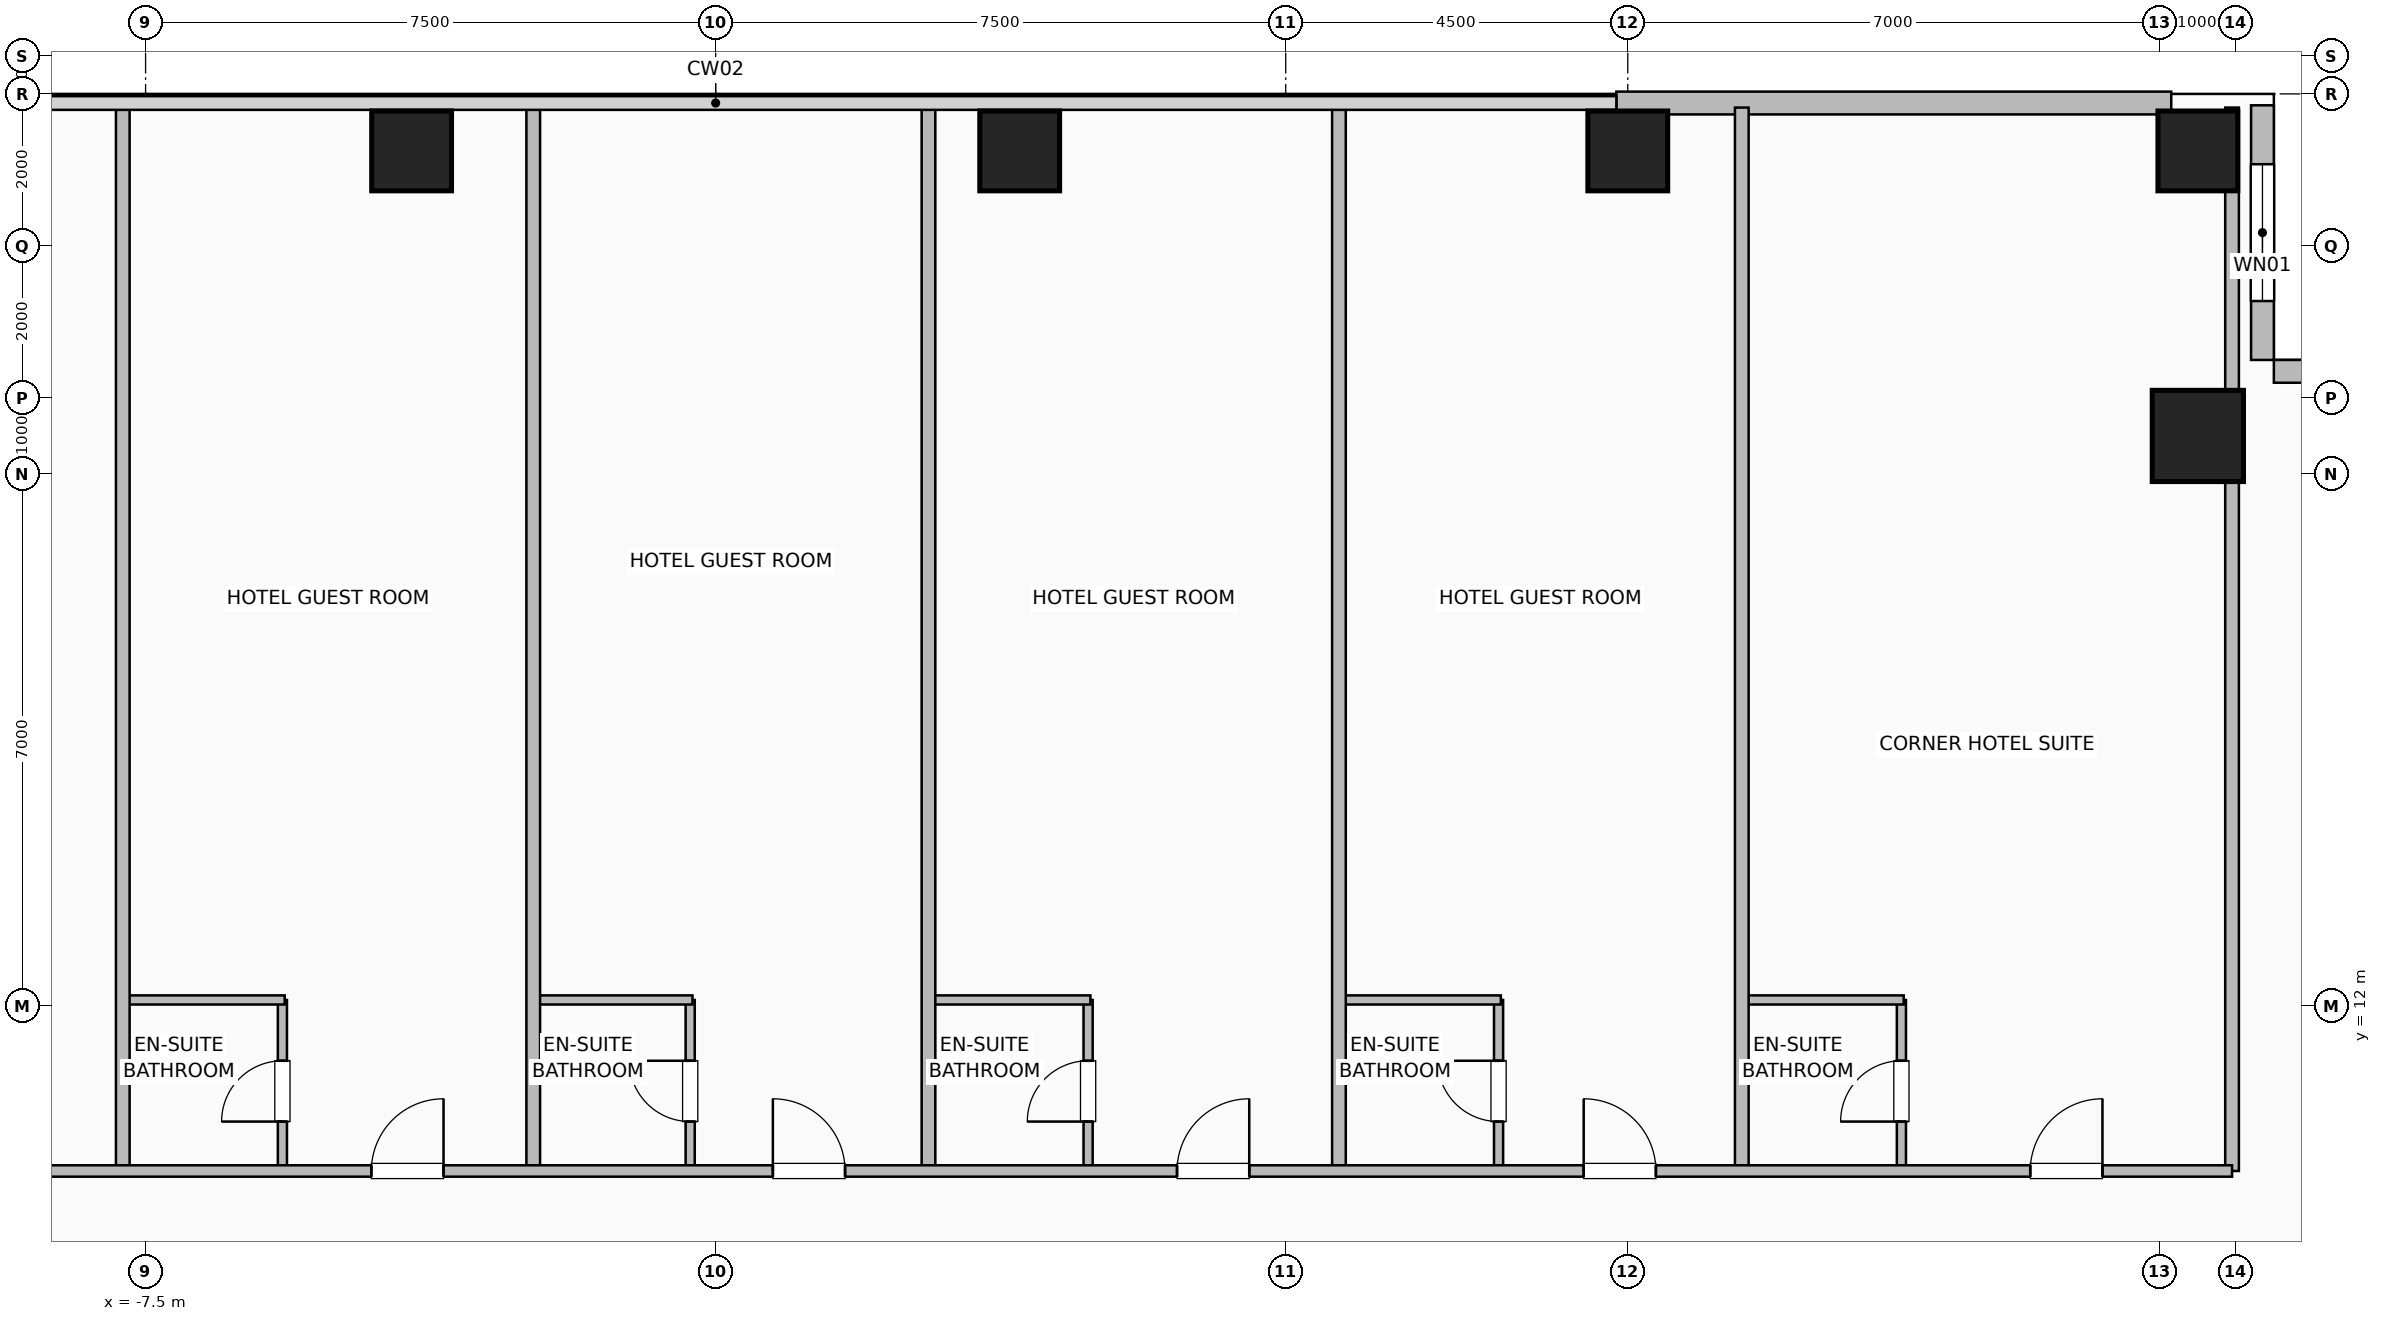
"""IFC4 building model, lengths in metres.
Left out: names, types, materials, properties, quantities, classifications, styles, units other than length and angle.
Written with IfcOpenShell. Run it as: python <this file> out.ifc"""

import sys

from ifc_helpers import new_model, si_unit, direction, frame, frame_2d, origin, origin_2d, place, context, subcontext, project, spatial, rectangle, hollow_rectangle, extrude, element, fill, save


model = new_model("IFC4")
c1 = context("Model", 3, precision=1e-05, world=origin(), true_north=direction((0.0, 1.0)))
c2 = subcontext(c1, "Body", "Model", "MODEL_VIEW")
j1 = project(units=[si_unit("LENGTHUNIT", "METRE"), si_unit("PLANEANGLEUNIT", "RADIAN")], contexts=[c1])
p1 = place(None, origin())
s1 = spatial("IfcSite", under=j1, at=p1, CompositionType="ELEMENT")
p2 = place(p1, origin())
s2 = spatial("IfcBuilding", under=s1, at=p2, CompositionType="ELEMENT")
p3 = place(p2, frame((0.0, 0.0, 34.0)))
s3 = spatial("IfcBuildingStorey", under=s2, at=p3, CompositionType="ELEMENT", Elevation=34.0)
for number, where, z_axis, x_axis in (
    (1, (-4.0, 23.25, 0.0), (0.0, 0.0, 1.0), (1.0, 0.0, 0.0)),
    (2, (4.0, 23.25, 0.0), (0.0, 0.0, 1.0), (1.0, 0.0, 0.0)),
    (3, (12.0, 23.25, 0.0), (0.0, 0.0, 1.0), (1.0, 0.0, 0.0)),
    (4, (19.5, 23.25, 0.0), (0.0, 0.0, 1.0), (1.0, 0.0, 0.0)),
):
    element("IfcColumn", number, at=place(p3, frame(where, z_axis=z_axis, x_axis=x_axis)), inside=s3, PredefinedType="COLUMN", context=c2, shape_type="SweptSolid", body=[
        extrude(hollow_rectangle(XDim=1.05, YDim=1.05, WallThickness=0.05, at=origin_2d()), origin(), (0.0, 0.0, 1.0), 3.5),
    ])
p4 = place(p3, frame((19.5, 19.5, 0.0), z_axis=(0.0, 0.0, 1.0), x_axis=(1.0, 0.0, 0.0)))
e5 = element("IfcColumn", 5, at=p4, inside=s3, PredefinedType="COLUMN", context=c2, shape_type="SweptSolid", body=[
    extrude(hollow_rectangle(XDim=1.2, YDim=1.2, WallThickness=0.055, at=origin_2d()), origin(), (0.0, 0.0, 1.0), 3.5),
])
p5 = place(p3, frame((11.85, 23.88, 0.0), z_axis=(0.0, 0.0, 1.0), x_axis=(1.0, 0.0, 0.0)))
e6 = element("IfcWall", 6, at=p5, inside=s3, PredefinedType="SOLIDWALL", context=c2, shape_type="SweptSolid", body=[
    extrude(rectangle(XDim=7.3, YDim=0.3, at=frame_2d((3.65, 0.0))), origin(), (0.0, 0.0, 1.0), 3.25),
])
p6 = place(p3, frame((20.35, 23.85, 0.0), z_axis=(0.0, 0.0, 1.0), x_axis=(0.0, -1.0, 0.0)))
e7 = element("IfcWall", 7, at=p6, inside=s3, PredefinedType="SOLIDWALL", context=c2, shape_type="SweptSolid", body=[
    extrude(rectangle(XDim=3.35, YDim=0.3, at=frame_2d((1.675, 0.0))), origin(), (0.0, 0.0, 1.0), 3.25),
])
p7 = place(p6, frame((0.775, 0.0, 0.9)))
e8 = element("IfcOpeningElement", 8, at=p7, cuts=e7, PredefinedType="OPENING", context=c2, shape_type="SweptSolid", body=[
    extrude(rectangle(XDim=1.8, YDim=1.8, at=frame_2d((0.9, 0.9))), frame((0.0, 0.16, 0.0), z_axis=(0.0, -1.0, 0.0), x_axis=(1.0, 0.0, 0.0)), (0.0, 0.0, 1.0), 0.32),
])
p8 = place(p3, frame((23.85, 20.35, 0.0), z_axis=(0.0, 0.0, 1.0), x_axis=(-1.0, 0.0, 0.0)))
e9 = element("IfcWall", 9, at=p8, inside=s3, PredefinedType="SOLIDWALL", context=c2, shape_type="SweptSolid", body=[
    extrude(rectangle(XDim=3.35, YDim=0.3, at=frame_2d((1.675, 0.0))), origin(), (0.0, 0.0, 1.0), 3.25),
])
p9 = place(p3, frame((-5.7, 9.83, 0.0), z_axis=(0.0, 0.0, 1.0), x_axis=(0.0, 1.0, 0.0)))
e10 = element("IfcWall", 10, at=p9, inside=s3, PredefinedType="PLUMBINGWALL", context=c2, shape_type="SweptSolid", body=[
    extrude(rectangle(XDim=2.25, YDim=0.12, at=frame_2d((1.125, 0.0))), origin(), (0.0, 0.0, 1.0), 3.25),
])
p10 = place(p9, frame((0.65, 0.0, 0.0)))
e11 = element("IfcOpeningElement", 11, at=p10, cuts=e10, PredefinedType="OPENING", context=c2, shape_type="SweptSolid", body=[
    extrude(rectangle(XDim=0.8, YDim=2.05, at=frame_2d((0.4, 1.025))), frame((0.0, 0.07, 0.0), z_axis=(0.0, -1.0, 0.0), x_axis=(1.0, 0.0, 0.0)), (0.0, 0.0, 1.0), 0.14),
])
p11 = place(p3, frame((-7.77, 12.08, 0.0), z_axis=(0.0, 0.0, 1.0), x_axis=(1.0, 0.0, 0.0)))
e12 = element("IfcWall", 12, at=p11, inside=s3, PredefinedType="PLUMBINGWALL", context=c2, shape_type="SweptSolid", body=[
    extrude(rectangle(XDim=2.1, YDim=0.12, at=frame_2d((1.05, 0.0))), origin(), (0.0, 0.0, 1.0), 3.25),
])
p12 = place(p3, frame((-0.335, 9.83, 0.0), z_axis=(0.0, 0.0, 1.0), x_axis=(0.0, 1.0, 0.0)))
e13 = element("IfcWall", 13, at=p12, inside=s3, PredefinedType="PLUMBINGWALL", context=c2, shape_type="SweptSolid", body=[
    extrude(rectangle(XDim=2.25, YDim=0.12, at=frame_2d((1.125, 0.0))), origin(), (0.0, 0.0, 1.0), 3.25),
])
p13 = place(p12, frame((0.65, 0.0, 0.0)))
e14 = element("IfcOpeningElement", 14, at=p13, cuts=e13, PredefinedType="OPENING", context=c2, shape_type="SweptSolid", body=[
    extrude(rectangle(XDim=0.8, YDim=2.05, at=frame_2d((0.4, 1.025))), frame((0.0, 0.07, 0.0), z_axis=(0.0, -1.0, 0.0), x_axis=(1.0, 0.0, 0.0)), (0.0, 0.0, 1.0), 0.14),
])
p14 = place(p3, frame((-2.37, 12.08, 0.0), z_axis=(0.0, 0.0, 1.0), x_axis=(1.0, 0.0, 0.0)))
e15 = element("IfcWall", 15, at=p14, inside=s3, PredefinedType="PLUMBINGWALL", context=c2, shape_type="SweptSolid", body=[
    extrude(rectangle(XDim=2.065, YDim=0.12, at=frame_2d((1.033, 0.0))), origin(), (0.0, 0.0, 1.0), 3.25),
])
p15 = place(p3, frame((4.9, 9.83, 0.0), z_axis=(0.0, 0.0, 1.0), x_axis=(0.0, 1.0, 0.0)))
e16 = element("IfcWall", 16, at=p15, inside=s3, PredefinedType="PLUMBINGWALL", context=c2, shape_type="SweptSolid", body=[
    extrude(rectangle(XDim=2.25, YDim=0.12, at=frame_2d((1.125, 0.0))), origin(), (0.0, 0.0, 1.0), 3.25),
])
p16 = place(p15, frame((0.65, 0.0, 0.0)))
e17 = element("IfcOpeningElement", 17, at=p16, cuts=e16, PredefinedType="OPENING", context=c2, shape_type="SweptSolid", body=[
    extrude(rectangle(XDim=0.8, YDim=2.05, at=frame_2d((0.4, 1.025))), frame((0.0, 0.07, 0.0), z_axis=(0.0, -1.0, 0.0), x_axis=(1.0, 0.0, 0.0)), (0.0, 0.0, 1.0), 0.14),
])
p17 = place(p3, frame((2.83, 12.08, 0.0), z_axis=(0.0, 0.0, 1.0), x_axis=(1.0, 0.0, 0.0)))
e18 = element("IfcWall", 18, at=p17, inside=s3, PredefinedType="PLUMBINGWALL", context=c2, shape_type="SweptSolid", body=[
    extrude(rectangle(XDim=2.1, YDim=0.12, at=frame_2d((1.05, 0.0))), origin(), (0.0, 0.0, 1.0), 3.25),
])
p18 = place(p3, frame((10.3, 9.83, 0.0), z_axis=(0.0, 0.0, 1.0), x_axis=(0.0, 1.0, 0.0)))
e19 = element("IfcWall", 19, at=p18, inside=s3, PredefinedType="PLUMBINGWALL", context=c2, shape_type="SweptSolid", body=[
    extrude(rectangle(XDim=2.25, YDim=0.12, at=frame_2d((1.125, 0.0))), origin(), (0.0, 0.0, 1.0), 3.25),
])
p19 = place(p18, frame((0.65, 0.0, 0.0)))
e20 = element("IfcOpeningElement", 20, at=p19, cuts=e19, PredefinedType="OPENING", context=c2, shape_type="SweptSolid", body=[
    extrude(rectangle(XDim=0.8, YDim=2.05, at=frame_2d((0.4, 1.025))), frame((0.0, 0.07, 0.0), z_axis=(0.0, -1.0, 0.0), x_axis=(1.0, 0.0, 0.0)), (0.0, 0.0, 1.0), 0.14),
])
p20 = place(p3, frame((8.23, 12.08, 0.0), z_axis=(0.0, 0.0, 1.0), x_axis=(1.0, 0.0, 0.0)))
e21 = element("IfcWall", 21, at=p20, inside=s3, PredefinedType="PLUMBINGWALL", context=c2, shape_type="SweptSolid", body=[
    extrude(rectangle(XDim=2.1, YDim=0.12, at=frame_2d((1.05, 0.0))), origin(), (0.0, 0.0, 1.0), 3.25),
])
p21 = place(p3, frame((15.6, 9.83, 0.0), z_axis=(0.0, 0.0, 1.0), x_axis=(0.0, 1.0, 0.0)))
e22 = element("IfcWall", 22, at=p21, inside=s3, PredefinedType="PLUMBINGWALL", context=c2, shape_type="SweptSolid", body=[
    extrude(rectangle(XDim=2.25, YDim=0.12, at=frame_2d((1.125, 0.0))), origin(), (0.0, 0.0, 1.0), 3.25),
])
p22 = place(p21, frame((0.65, 0.0, 0.0)))
e23 = element("IfcOpeningElement", 23, at=p22, cuts=e22, PredefinedType="OPENING", context=c2, shape_type="SweptSolid", body=[
    extrude(rectangle(XDim=0.8, YDim=2.05, at=frame_2d((0.4, 1.025))), frame((0.0, 0.07, 0.0), z_axis=(0.0, -1.0, 0.0), x_axis=(1.0, 0.0, 0.0)), (0.0, 0.0, 1.0), 0.14),
])
p23 = place(p3, frame((13.53, 12.08, 0.0), z_axis=(0.0, 0.0, 1.0), x_axis=(1.0, 0.0, 0.0)))
e24 = element("IfcWall", 24, at=p23, inside=s3, PredefinedType="PLUMBINGWALL", context=c2, shape_type="SweptSolid", body=[
    extrude(rectangle(XDim=2.1, YDim=0.12, at=frame_2d((1.05, 0.0))), origin(), (0.0, 0.0, 1.0), 3.25),
])
for number, where, z_axis, x_axis in (
    (25, (-7.8, 9.83, 0.0), (0.0, 0.0, 1.0), (0.0, 1.0, 0.0)),
    (26, (-2.4, 9.83, 0.0), (0.0, 0.0, 1.0), (0.0, 1.0, 0.0)),
    (27, (2.8, 9.83, 0.0), (0.0, 0.0, 1.0), (0.0, 1.0, 0.0)),
    (28, (8.2, 9.83, 0.0), (0.0, 0.0, 1.0), (0.0, 1.0, 0.0)),
    (29, (13.5, 9.83, 0.0), (0.0, 0.0, 1.0), (0.0, 1.0, 0.0)),
    (30, (19.95, 9.83, 0.0), (0.0, 0.0, 1.0), (0.0, 1.0, 0.0)),
):
    element("IfcWall", number, at=place(p3, frame(where, z_axis=z_axis, x_axis=x_axis)), inside=s3, PredefinedType="PARTITIONING", context=c2, shape_type="SweptSolid", body=[
        extrude(rectangle(XDim=13.99, YDim=0.18, at=frame_2d((6.995, 0.0))), origin(), (0.0, 0.0, 1.0), 3.25),
    ])
p24 = place(p3, frame((-19.95, 9.83, 0.0), z_axis=(0.0, 0.0, 1.0), x_axis=(1.0, 0.0, 0.0)))
e31 = element("IfcWall", 31, at=p24, inside=s3, PredefinedType="PARTITIONING", context=c2, shape_type="SweptSolid", body=[
    extrude(rectangle(XDim=39.9, YDim=0.15, at=frame_2d((19.95, 0.0))), origin(), (0.0, 0.0, 1.0), 3.25),
])
p25 = place(p24, frame((3.945, 0.0, 0.0)))
e32 = element("IfcOpeningElement", 32, at=p25, cuts=e31, PredefinedType="OPENING", context=c2, shape_type="SweptSolid", body=[
    extrude(rectangle(XDim=0.95, YDim=2.08, at=frame_2d((0.475, 1.04))), frame((0.0, 0.085, 0.0), z_axis=(0.0, -1.0, 0.0), x_axis=(1.0, 0.0, 0.0)), (0.0, 0.0, 1.0), 0.17),
])
p26 = place(p24, frame((10.02, 0.0, 0.0)))
e33 = element("IfcOpeningElement", 33, at=p26, cuts=e31, PredefinedType="OPENING", context=c2, shape_type="SweptSolid", body=[
    extrude(rectangle(XDim=0.95, YDim=2.08, at=frame_2d((0.475, 1.04))), frame((0.0, 0.085, 0.0), z_axis=(0.0, -1.0, 0.0), x_axis=(1.0, 0.0, 0.0)), (0.0, 0.0, 1.0), 0.17),
])
p27 = place(p24, frame((15.42, 0.0, 0.0)))
e34 = element("IfcOpeningElement", 34, at=p27, cuts=e31, PredefinedType="OPENING", context=c2, shape_type="SweptSolid", body=[
    extrude(rectangle(XDim=0.95, YDim=2.08, at=frame_2d((0.475, 1.04))), frame((0.0, 0.085, 0.0), z_axis=(0.0, -1.0, 0.0), x_axis=(1.0, 0.0, 0.0)), (0.0, 0.0, 1.0), 0.17),
])
p28 = place(p24, frame((20.702, 0.0, 0.0)))
e35 = element("IfcOpeningElement", 35, at=p28, cuts=e31, PredefinedType="OPENING", context=c2, shape_type="SweptSolid", body=[
    extrude(rectangle(XDim=0.95, YDim=2.08, at=frame_2d((0.475, 1.04))), frame((0.0, 0.085, 0.0), z_axis=(0.0, -1.0, 0.0), x_axis=(1.0, 0.0, 0.0)), (0.0, 0.0, 1.0), 0.17),
])
p29 = place(p24, frame((26.02, 0.0, 0.0)))
e36 = element("IfcOpeningElement", 36, at=p29, cuts=e31, PredefinedType="OPENING", context=c2, shape_type="SweptSolid", body=[
    extrude(rectangle(XDim=0.95, YDim=2.08, at=frame_2d((0.475, 1.04))), frame((0.0, 0.085, 0.0), z_axis=(0.0, -1.0, 0.0), x_axis=(1.0, 0.0, 0.0)), (0.0, 0.0, 1.0), 0.17),
])
p30 = place(p24, frame((31.37, 0.0, 0.0)))
e37 = element("IfcOpeningElement", 37, at=p30, cuts=e31, PredefinedType="OPENING", context=c2, shape_type="SweptSolid", body=[
    extrude(rectangle(XDim=0.95, YDim=2.08, at=frame_2d((0.475, 1.04))), frame((0.0, 0.085, 0.0), z_axis=(0.0, -1.0, 0.0), x_axis=(1.0, 0.0, 0.0)), (0.0, 0.0, 1.0), 0.17),
])
p31 = place(p24, frame((37.245, 0.0, 0.0)))
e38 = element("IfcOpeningElement", 38, at=p31, cuts=e31, PredefinedType="OPENING", context=c2, shape_type="SweptSolid", body=[
    extrude(rectangle(XDim=0.95, YDim=2.08, at=frame_2d((0.475, 1.04))), frame((0.0, 0.085, 0.0), z_axis=(0.0, -1.0, 0.0), x_axis=(1.0, 0.0, 0.0)), (0.0, 0.0, 1.0), 0.17),
])
p32 = place(p7, origin())
e39 = element("IfcWindow", 39, at=p32, inside=s3, PartitioningType="SINGLE_PANEL", PredefinedType="WINDOW", context=c2, shape_type="SweptSolid", body=[
    extrude(rectangle(XDim=1.8, YDim=1.8, at=frame_2d((0.9, 0.9))), frame((0.0, 0.03, 0.0), z_axis=(0.0, -1.0, 0.0), x_axis=(1.0, 0.0, 0.0)), (0.0, 0.0, 1.0), 0.06),
])
fill(e8, e39)
p33 = place(p10, origin())
e40 = element("IfcDoor", 40, at=p33, inside=s3, OperationType="SINGLE_SWING_LEFT", PredefinedType="DOOR", context=c2, shape_type="SweptSolid", body=[
    extrude(rectangle(XDim=0.8, YDim=2.05, at=frame_2d((0.4, 1.025))), frame((0.0, 0.025, 0.0), z_axis=(0.0, -1.0, 0.0), x_axis=(1.0, 0.0, 0.0)), (0.0, 0.0, 1.0), 0.05),
])
fill(e11, e40)
p34 = place(p13, origin())
e41 = element("IfcDoor", 41, at=p34, inside=s3, OperationType="SINGLE_SWING_RIGHT", PredefinedType="DOOR", context=c2, shape_type="SweptSolid", body=[
    extrude(rectangle(XDim=0.8, YDim=2.05, at=frame_2d((0.4, 1.025))), frame((0.0, 0.025, 0.0), z_axis=(0.0, -1.0, 0.0), x_axis=(1.0, 0.0, 0.0)), (0.0, 0.0, 1.0), 0.05),
])
fill(e14, e41)
p35 = place(p16, origin())
e42 = element("IfcDoor", 42, at=p35, inside=s3, OperationType="SINGLE_SWING_LEFT", PredefinedType="DOOR", context=c2, shape_type="SweptSolid", body=[
    extrude(rectangle(XDim=0.8, YDim=2.05, at=frame_2d((0.4, 1.025))), frame((0.0, 0.025, 0.0), z_axis=(0.0, -1.0, 0.0), x_axis=(1.0, 0.0, 0.0)), (0.0, 0.0, 1.0), 0.05),
])
fill(e17, e42)
p36 = place(p19, origin())
e43 = element("IfcDoor", 43, at=p36, inside=s3, OperationType="SINGLE_SWING_RIGHT", PredefinedType="DOOR", context=c2, shape_type="SweptSolid", body=[
    extrude(rectangle(XDim=0.8, YDim=2.05, at=frame_2d((0.4, 1.025))), frame((0.0, 0.025, 0.0), z_axis=(0.0, -1.0, 0.0), x_axis=(1.0, 0.0, 0.0)), (0.0, 0.0, 1.0), 0.05),
])
fill(e20, e43)
p37 = place(p22, origin())
e44 = element("IfcDoor", 44, at=p37, inside=s3, OperationType="SINGLE_SWING_LEFT", PredefinedType="DOOR", context=c2, shape_type="SweptSolid", body=[
    extrude(rectangle(XDim=0.8, YDim=2.05, at=frame_2d((0.4, 1.025))), frame((0.0, 0.025, 0.0), z_axis=(0.0, -1.0, 0.0), x_axis=(1.0, 0.0, 0.0)), (0.0, 0.0, 1.0), 0.05),
])
fill(e23, e44)
p38 = place(p27, origin())
e45 = element("IfcDoor", 45, at=p38, inside=s3, OperationType="SINGLE_SWING_RIGHT", PredefinedType="DOOR", context=c2, shape_type="SweptSolid", body=[
    extrude(rectangle(XDim=0.95, YDim=2.08, at=frame_2d((0.475, 1.04))), frame((0.0, 0.025, 0.0), z_axis=(0.0, -1.0, 0.0), x_axis=(1.0, 0.0, 0.0)), (0.0, 0.0, 1.0), 0.05),
])
fill(e34, e45)
p39 = place(p28, origin())
e46 = element("IfcDoor", 46, at=p39, inside=s3, OperationType="SINGLE_SWING_LEFT", PredefinedType="DOOR", context=c2, shape_type="SweptSolid", body=[
    extrude(rectangle(XDim=0.95, YDim=2.08, at=frame_2d((0.475, 1.04))), frame((0.0, 0.025, 0.0), z_axis=(0.0, -1.0, 0.0), x_axis=(1.0, 0.0, 0.0)), (0.0, 0.0, 1.0), 0.05),
])
fill(e35, e46)
p40 = place(p29, origin())
e47 = element("IfcDoor", 47, at=p40, inside=s3, OperationType="SINGLE_SWING_RIGHT", PredefinedType="DOOR", context=c2, shape_type="SweptSolid", body=[
    extrude(rectangle(XDim=0.95, YDim=2.08, at=frame_2d((0.475, 1.04))), frame((0.0, 0.025, 0.0), z_axis=(0.0, -1.0, 0.0), x_axis=(1.0, 0.0, 0.0)), (0.0, 0.0, 1.0), 0.05),
])
fill(e36, e47)
p41 = place(p30, origin())
e48 = element("IfcDoor", 48, at=p41, inside=s3, OperationType="SINGLE_SWING_LEFT", PredefinedType="DOOR", context=c2, shape_type="SweptSolid", body=[
    extrude(rectangle(XDim=0.95, YDim=2.08, at=frame_2d((0.475, 1.04))), frame((0.0, 0.025, 0.0), z_axis=(0.0, -1.0, 0.0), x_axis=(1.0, 0.0, 0.0)), (0.0, 0.0, 1.0), 0.05),
])
fill(e37, e48)
p42 = place(p31, origin())
e49 = element("IfcDoor", 49, at=p42, inside=s3, OperationType="SINGLE_SWING_RIGHT", PredefinedType="DOOR", context=c2, shape_type="SweptSolid", body=[
    extrude(rectangle(XDim=0.95, YDim=2.08, at=frame_2d((0.475, 1.04))), frame((0.0, 0.025, 0.0), z_axis=(0.0, -1.0, 0.0), x_axis=(1.0, 0.0, 0.0)), (0.0, 0.0, 1.0), 0.05),
])
fill(e38, e49)
save(model, sys.argv[1])
